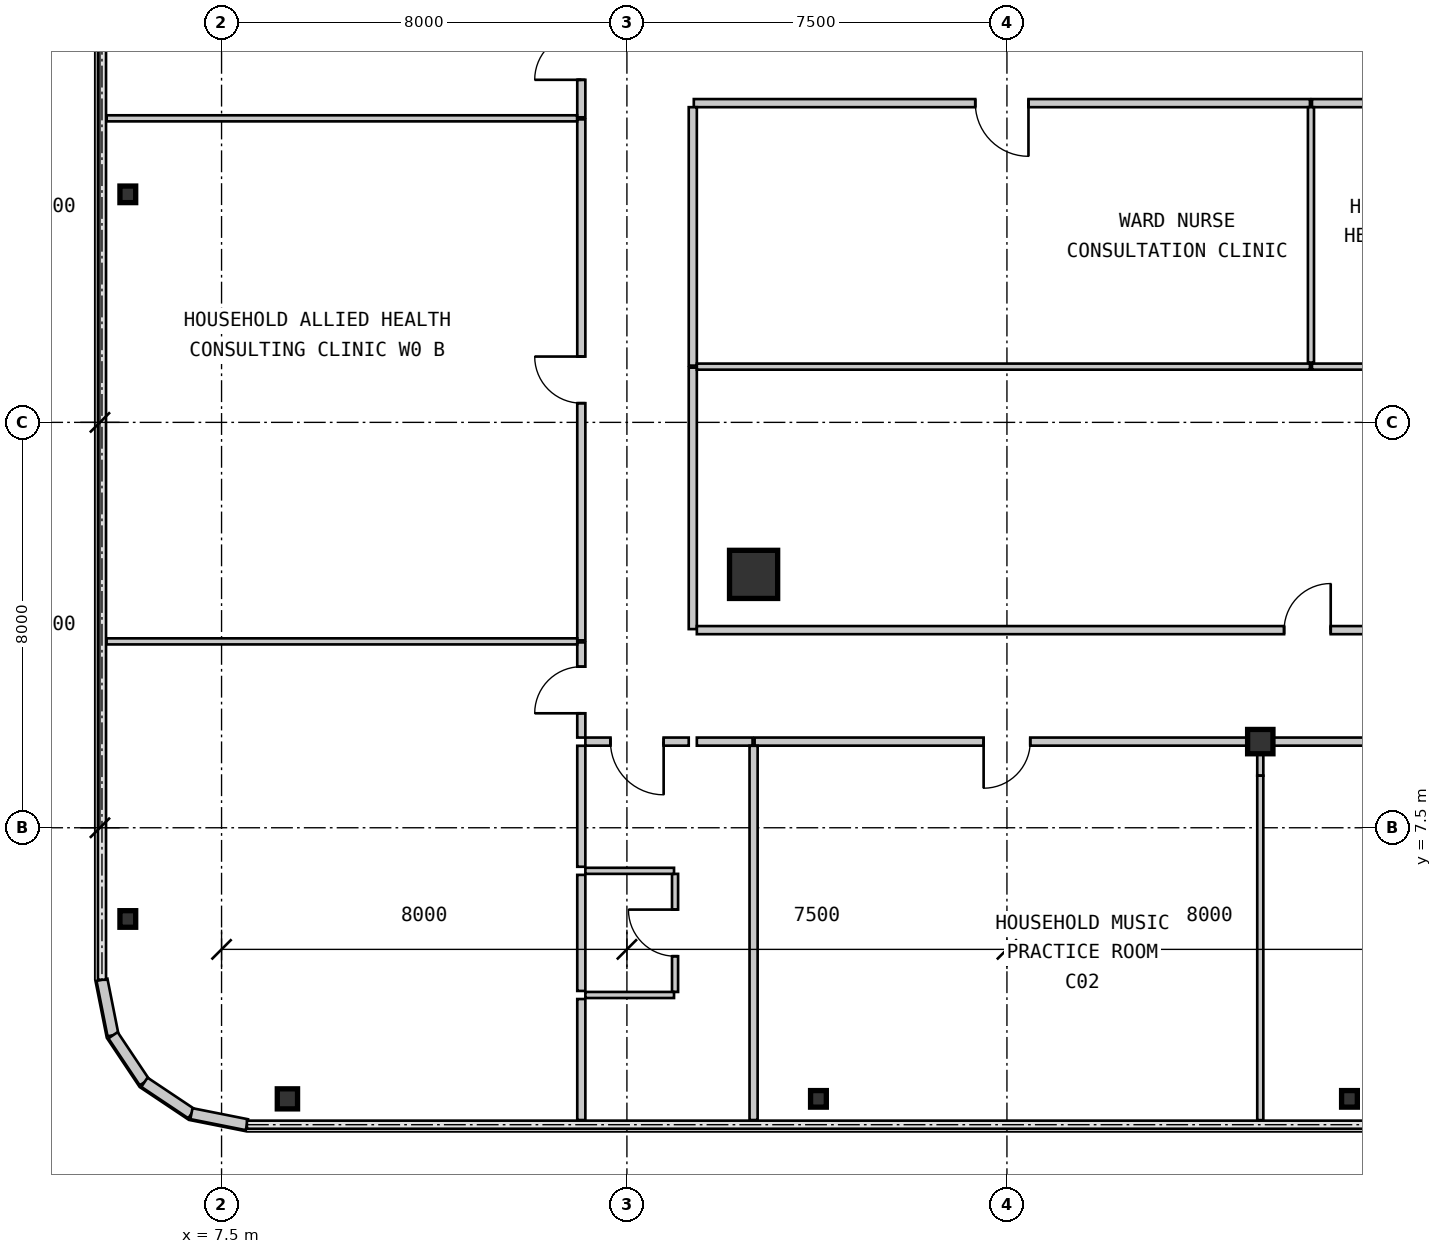
"""IFC4 building model, lengths in metres.
Left out: names, types, materials, properties, quantities, classifications, styles, units other than length and angle.
Written with IfcOpenShell. Run it as: python <this file> out.ifc"""

import sys

from ifc_helpers import new_model, si_unit, direction, frame, frame_2d, origin, origin_2d, place, context, subcontext, project, spatial, rectangle, i_section, extrude, source, transform, mapped, element, fill, save


model = new_model("IFC4")
c1 = context("Model", 3, precision=1e-05, world=origin(), true_north=direction((0.0, 1.0)))
c2 = subcontext(c1, "Body", "Model", "MODEL_VIEW")
j1 = project(units=[si_unit("LENGTHUNIT", "METRE"), si_unit("PLANEANGLEUNIT", "RADIAN")], contexts=[c1])
p1 = place(None, origin())
s1 = spatial("IfcSite", under=j1, at=p1, CompositionType="ELEMENT")
p2 = place(p1, origin())
s2 = spatial("IfcBuilding", under=s1, at=p2, CompositionType="ELEMENT")
p3 = place(p2, frame((0.0, 0.0, 26.25)))
s3 = spatial("IfcBuildingStorey", under=s2, at=p3, CompositionType="ELEMENT", Elevation=26.25)
m1 = source(origin(), c2, "Body", "SweptSolid", [
    extrude(i_section(OverallWidth=0.5, OverallDepth=0.48, WebThickness=0.028, FlangeThickness=0.044, at=origin_2d()), origin(), (0.0, 0.0, 1.0), 3.15),
])
p4 = place(p3, frame((28.0, 9.2, 0.0), z_axis=(0.0, 0.0, 1.0), x_axis=(1.0, 0.0, 0.0)))
e1 = element("IfcColumn", 1, at=p4, inside=s3, PredefinedType="COLUMN", context=c2, shape_type="MappedRepresentation", body=[
    mapped(m1, transform((0.0, 0.0, 0.0), scale=1.0)),
])
m2 = source(origin(), c2, "Body", "SweptSolid", [
    extrude(rectangle(XDim=0.95, YDim=0.95, at=origin_2d()), origin(), (0.0, 0.0, 1.0), 3.15),
])
p5 = place(p3, frame((18.0, 12.5, 0.0), z_axis=(0.0, 0.0, 1.0), x_axis=(1.0, 0.0, 0.0)))
e2 = element("IfcColumn", 2, at=p5, inside=s3, PredefinedType="COLUMN", context=c2, shape_type="MappedRepresentation", body=[
    mapped(m2, transform((0.0, 0.0, 0.0), scale=1.0)),
])
m3 = source(origin(), c2, "Body", "SweptSolid", [
    extrude(i_section(OverallWidth=0.4, OverallDepth=0.396, WebThickness=0.022, FlangeThickness=0.034, at=origin_2d()), origin(), (0.0, 0.0, 1.0), 3.15),
])
p6 = place(p3, frame((8.8, 2.15, 0.0), z_axis=(0.0, 0.0, 1.0), x_axis=(1.0, 0.0, 0.0)))
e3 = element("IfcColumn", 3, at=p6, inside=s3, PredefinedType="COLUMN", context=c2, shape_type="MappedRepresentation", body=[
    mapped(m3, transform((0.0, 0.0, 0.0), scale=1.0)),
])
m4 = source(origin(), c2, "Body", "SweptSolid", [
    extrude(i_section(OverallWidth=0.311, OverallDepth=0.327, WebThickness=0.016, FlangeThickness=0.025, at=origin_2d()), origin(), (0.0, 0.0, 1.0), 3.15),
])
for number, where, z_axis, x_axis in (
    (4, (19.28, 2.15, 0.0), (0.0, 0.0, 1.0), (1.0, 0.0, 0.0)),
    (5, (29.76, 2.15, 0.0), (0.0, 0.0, 1.0), (1.0, 0.0, 0.0)),
    (6, (5.65, 5.7, 0.0), (0.0, 0.0, 1.0), (1.0, 0.0, 0.0)),
    (7, (5.65, 20.0, 0.0), (0.0, 0.0, 1.0), (1.0, 0.0, 0.0)),
):
    element("IfcColumn", number, at=place(p3, frame(where, z_axis=z_axis, x_axis=x_axis)), inside=s3, PredefinedType="COLUMN", context=c2, shape_type="MappedRepresentation", body=[
        mapped(m4, transform((0.0, 0.0, 0.0), scale=1.0)),
    ])
m5 = source(origin(), c2, "Body", "SweptSolid", [
    extrude(rectangle(XDim=1.116, YDim=0.22, at=frame_2d((0.558, 0.0))), origin(), (0.0, 0.0, 1.0), 2.93),
])
for number, where, z_axis, x_axis in (
    (8, (5.14, 4.5, 0.0), (0.0, 0.0, 1.0), (0.195, -0.981, 0.0)),
    (9, (5.358, 3.406, 0.0), (0.0, 0.0, 1.0), (0.556, -0.831, 0.0)),
    (10, (5.978, 2.478, 0.0), (0.0, 0.0, 1.0), (0.831, -0.556, 0.0)),
    (11, (6.906, 1.858, 0.0), (0.0, 0.0, 1.0), (0.981, -0.195, 0.0)),
):
    element("IfcWall", number, at=place(p3, frame(where, z_axis=z_axis, x_axis=x_axis)), inside=s3, PredefinedType="SOLIDWALL", context=c2, shape_type="MappedRepresentation", body=[
        mapped(m5, transform((0.0, 0.0, 0.0), scale=1.0)),
    ])
m6 = source(origin(), c2, "Body", "SweptSolid", [
    extrude(rectangle(XDim=5.16, YDim=0.16, at=frame_2d((2.58, 0.0))), origin(), (0.0, 0.0, 1.0), 2.93),
])
p7 = place(p3, frame((16.8, 16.58, 0.0), z_axis=(0.0, 0.0, 1.0), x_axis=(0.0, -1.0, 0.0)))
e12 = element("IfcWall", 12, at=p7, inside=s3, PredefinedType="PARTITIONING", context=c2, shape_type="MappedRepresentation", body=[
    mapped(m6, transform((0.0, 0.0, 0.0), scale=1.0)),
])
m7 = source(origin(), c2, "Body", "SweptSolid", [
    extrude(rectangle(XDim=12.159, YDim=0.16, at=frame_2d((6.08, 0.0))), origin(), (0.0, 0.0, 1.0), 2.93),
])
p8 = place(p3, frame((28.98, 21.8, 0.0), z_axis=(0.0, 0.0, 1.0), x_axis=(-1.0, 0.0, 0.0)))
e13 = element("IfcWall", 13, at=p8, inside=s3, PredefinedType="PARTITIONING", context=c2, shape_type="MappedRepresentation", body=[
    mapped(m7, transform((0.0, 0.0, 0.0), scale=1.0)),
])
m8 = source(origin(), c2, "Body", "SweptSolid", [
    extrude(rectangle(XDim=1.05, YDim=2.1, at=frame_2d((0.525, 1.05))), frame((0.0, 0.09, 0.0), z_axis=(0.0, -1.0, 0.0), x_axis=(1.0, 0.0, 0.0)), (0.0, 0.0, 1.0), 0.18),
])
p9 = place(p8, frame((5.555, 0.0, 0.0)))
e14 = element("IfcOpeningElement", 14, at=p9, cuts=e13, PredefinedType="OPENING", context=c2, shape_type="MappedRepresentation", body=[
    mapped(m8, transform((0.0, 0.0, 0.0), scale=1.0)),
])
m9 = source(origin(), c2, "Body", "SweptSolid", [
    extrude(rectangle(XDim=5.1, YDim=0.16, at=frame_2d((2.55, 0.0))), origin(), (0.0, 0.0, 1.0), 2.93),
])
p10 = place(p3, frame((16.8, 21.72, 0.0), z_axis=(0.0, 0.0, 1.0), x_axis=(0.0, -1.0, 0.0)))
e15 = element("IfcWall", 15, at=p10, inside=s3, PredefinedType="PARTITIONING", context=c2, shape_type="MappedRepresentation", body=[
    mapped(m9, transform((0.0, 0.0, 0.0), scale=1.0)),
])
m10 = source(origin(), c2, "Body", "SweptSolid", [
    extrude(rectangle(XDim=24.159, YDim=0.16, at=frame_2d((12.08, 0.0))), origin(), (0.0, 0.0, 1.0), 2.93),
])
p11 = place(p3, frame((53.18, 21.8, 0.0), z_axis=(0.0, 0.0, 1.0), x_axis=(-1.0, 0.0, 0.0)))
e16 = element("IfcWall", 16, at=p11, inside=s3, PredefinedType="PARTITIONING", context=c2, shape_type="MappedRepresentation", body=[
    mapped(m10, transform((0.0, 0.0, 0.0), scale=1.0)),
])
m11 = source(origin(), c2, "Body", "SweptSolid", [
    extrude(rectangle(XDim=0.92, YDim=2.1, at=frame_2d((0.46, 1.05))), frame((0.0, 0.09, 0.0), z_axis=(0.0, -1.0, 0.0), x_axis=(1.0, 0.0, 0.0)), (0.0, 0.0, 1.0), 0.18),
])
p12 = place(p11, frame((11.62, 0.0, 0.0)))
e17 = element("IfcOpeningElement", 17, at=p12, cuts=e16, PredefinedType="OPENING", context=c2, shape_type="MappedRepresentation", body=[
    mapped(m11, transform((0.0, 0.0, 0.0), scale=1.0)),
])
m12 = source(origin(), c2, "Body", "SweptSolid", [
    extrude(rectangle(XDim=2.04, YDim=0.16, at=frame_2d((1.02, 0.0))), origin(), (0.0, 0.0, 1.0), 2.93),
])
p13 = place(p3, frame((16.72, 9.2, 0.0), z_axis=(0.0, 0.0, 1.0), x_axis=(-1.0, 0.0, 0.0)))
e18 = element("IfcWall", 18, at=p13, inside=s3, PredefinedType="PARTITIONING", context=c2, shape_type="MappedRepresentation", body=[
    mapped(m12, transform((0.0, 0.0, 0.0), scale=1.0)),
])
p14 = place(p13, frame((0.495, 0.0, 0.0)))
e19 = element("IfcOpeningElement", 19, at=p14, cuts=e18, PredefinedType="OPENING", context=c2, shape_type="MappedRepresentation", body=[
    mapped(m8, transform((0.0, 0.0, 0.0), scale=1.0)),
])
m13 = source(origin(), c2, "Body", "SweptSolid", [
    extrude(rectangle(XDim=1.878, YDim=0.16, at=frame_2d((0.939, 0.0))), origin(), (0.0, 0.0, 1.0), 2.93),
])
p15 = place(p3, frame((14.6, 9.28, 0.0), z_axis=(0.0, 0.0, 1.0), x_axis=(0.0, 1.0, 0.0)))
e20 = element("IfcWall", 20, at=p15, inside=s3, PredefinedType="PARTITIONING", context=c2, shape_type="MappedRepresentation", body=[
    mapped(m13, transform((0.0, 0.0, 0.0), scale=1.0)),
])
p16 = place(p15, frame((0.479, 0.0, 0.0)))
e21 = element("IfcOpeningElement", 21, at=p16, cuts=e20, PredefinedType="OPENING", context=c2, shape_type="MappedRepresentation", body=[
    mapped(m11, transform((0.0, 0.0, 0.0), scale=1.0)),
])
m14 = source(origin(), c2, "Body", "SweptSolid", [
    extrude(rectangle(XDim=10.281, YDim=0.16, at=frame_2d((5.141, 0.0))), origin(), (0.0, 0.0, 1.0), 2.93),
])
p17 = place(p3, frame((14.6, 11.198, 0.0), z_axis=(0.0, 0.0, 1.0), x_axis=(0.0, 1.0, 0.0)))
e22 = element("IfcWall", 22, at=p17, inside=s3, PredefinedType="PARTITIONING", context=c2, shape_type="MappedRepresentation", body=[
    mapped(m14, transform((0.0, 0.0, 0.0), scale=1.0)),
])
p18 = place(p17, frame((4.681, 0.0, 0.0)))
e23 = element("IfcOpeningElement", 23, at=p18, cuts=e22, PredefinedType="OPENING", context=c2, shape_type="MappedRepresentation", body=[
    mapped(m11, transform((0.0, 0.0, 0.0), scale=1.0)),
])
m15 = source(origin(), c2, "Body", "SweptSolid", [
    extrude(rectangle(XDim=2.4, YDim=0.16, at=frame_2d((1.2, 0.0))), origin(), (0.0, 0.0, 1.0), 2.93),
])
p19 = place(p3, frame((14.6, 21.52, 0.0), z_axis=(0.0, 0.0, 1.0), x_axis=(0.0, 1.0, 0.0)))
e24 = element("IfcWall", 24, at=p19, inside=s3, PredefinedType="PARTITIONING", context=c2, shape_type="MappedRepresentation", body=[
    mapped(m15, transform((0.0, 0.0, 0.0), scale=1.0)),
])
p20 = place(p19, frame((0.74, 0.0, 0.0)))
e25 = element("IfcOpeningElement", 25, at=p20, cuts=e24, PredefinedType="OPENING", context=c2, shape_type="MappedRepresentation", body=[
    mapped(m11, transform((0.0, 0.0, 0.0), scale=1.0)),
])
m16 = source(origin(), c2, "Body", "SweptSolid", [
    extrude(rectangle(XDim=24.1, YDim=0.16, at=frame_2d((12.05, 0.0))), origin(), (0.0, 0.0, 1.0), 2.93),
])
p21 = place(p3, frame((16.88, 11.4, 0.0), z_axis=(0.0, 0.0, 1.0), x_axis=(1.0, 0.0, 0.0)))
e26 = element("IfcWall", 26, at=p21, inside=s3, PredefinedType="PARTITIONING", context=c2, shape_type="MappedRepresentation", body=[
    mapped(m16, transform((0.0, 0.0, 0.0), scale=1.0)),
])
p22 = place(p21, frame((11.59, 0.0, 0.0)))
e27 = element("IfcOpeningElement", 27, at=p22, cuts=e26, PredefinedType="OPENING", context=c2, shape_type="MappedRepresentation", body=[
    mapped(m11, transform((0.0, 0.0, 0.0), scale=1.0)),
])
m17 = source(origin(), c2, "Body", "SweptSolid", [
    extrude(rectangle(XDim=1.1, YDim=0.16, at=frame_2d((0.55, 0.0))), origin(), (0.0, 0.0, 1.0), 2.93),
])
p23 = place(p3, frame((17.98, 9.2, 0.0), z_axis=(0.0, 0.0, 1.0), x_axis=(-1.0, 0.0, 0.0)))
e28 = element("IfcWall", 28, at=p23, inside=s3, PredefinedType="PARTITIONING", context=c2, shape_type="MappedRepresentation", body=[
    mapped(m17, transform((0.0, 0.0, 0.0), scale=1.0)),
])
m18 = source(origin(), c2, "Body", "SweptSolid", [
    extrude(rectangle(XDim=9.959, YDim=0.16, at=frame_2d((4.98, 0.0))), origin(), (0.0, 0.0, 1.0), 2.93),
])
p24 = place(p3, frame((27.98, 9.2, 0.0), z_axis=(0.0, 0.0, 1.0), x_axis=(-1.0, 0.0, 0.0)))
e29 = element("IfcWall", 29, at=p24, inside=s3, PredefinedType="PARTITIONING", context=c2, shape_type="MappedRepresentation", body=[
    mapped(m18, transform((0.0, 0.0, 0.0), scale=1.0)),
])
p25 = place(p24, frame((4.52, 0.0, 0.0)))
e30 = element("IfcOpeningElement", 30, at=p25, cuts=e29, PredefinedType="OPENING", context=c2, shape_type="MappedRepresentation", body=[
    mapped(m11, transform((0.0, 0.0, 0.0), scale=1.0)),
])
m19 = source(origin(), c2, "Body", "SweptSolid", [
    extrude(rectangle(XDim=13.959, YDim=0.16, at=frame_2d((6.98, 0.0))), origin(), (0.0, 0.0, 1.0), 2.328),
])
p26 = place(p3, frame((41.98, 9.2, 0.0), z_axis=(0.0, 0.0, 1.0), x_axis=(-1.0, 0.0, 0.0)))
e31 = element("IfcWall", 31, at=p26, inside=s3, PredefinedType="PARTITIONING", context=c2, shape_type="MappedRepresentation", body=[
    mapped(m19, transform((0.0, 0.0, 0.0), scale=1.0)),
])
p27 = place(p26, frame((6.52, 0.0, 0.0)))
e32 = element("IfcOpeningElement", 32, at=p27, cuts=e31, PredefinedType="OPENING", context=c2, shape_type="MappedRepresentation", body=[
    mapped(m11, transform((0.0, 0.0, 0.0), scale=1.0)),
])
m20 = source(origin(), c2, "Body", "SweptSolid", [
    extrude(rectangle(XDim=12.1, YDim=0.12, at=frame_2d((6.05, 0.0))), origin(), (0.0, 0.0, 1.0), 2.93),
])
p28 = place(p3, frame((16.88, 16.6, 0.0), z_axis=(0.0, 0.0, 1.0), x_axis=(1.0, 0.0, 0.0)))
e33 = element("IfcWall", 33, at=p28, inside=s3, PredefinedType="PARTITIONING", context=c2, shape_type="MappedRepresentation", body=[
    mapped(m20, transform((0.0, 0.0, 0.0), scale=1.0)),
])
m21 = source(origin(), c2, "Body", "SweptSolid", [
    extrude(rectangle(XDim=11.9, YDim=0.12, at=frame_2d((5.95, 0.0))), origin(), (0.0, 0.0, 1.0), 2.93),
])
p29 = place(p3, frame((29.02, 16.6, 0.0), z_axis=(0.0, 0.0, 1.0), x_axis=(1.0, 0.0, 0.0)))
e34 = element("IfcWall", 34, at=p29, inside=s3, PredefinedType="PARTITIONING", context=c2, shape_type="MappedRepresentation", body=[
    mapped(m21, transform((0.0, 0.0, 0.0), scale=1.0)),
])
m22 = source(origin(), c2, "Body", "SweptSolid", [
    extrude(rectangle(XDim=5.04, YDim=0.12, at=frame_2d((2.52, 0.0))), origin(), (0.0, 0.0, 1.0), 2.93),
])
p30 = place(p3, frame((29.0, 21.72, 0.0), z_axis=(0.0, 0.0, 1.0), x_axis=(0.0, -1.0, 0.0)))
e35 = element("IfcWall", 35, at=p30, inside=s3, PredefinedType="PARTITIONING", context=c2, shape_type="MappedRepresentation", body=[
    mapped(m22, transform((0.0, 0.0, 0.0), scale=1.0)),
])
m23 = source(origin(), c2, "Body", "SweptSolid", [
    extrude(rectangle(XDim=2.33, YDim=0.12, at=frame_2d((1.165, 0.0))), origin(), (0.0, 0.0, 1.0), 2.93),
])
p31 = place(p3, frame((16.45, 4.26, 0.0), z_axis=(0.0, 0.0, 1.0), x_axis=(0.0, 1.0, 0.0)))
e36 = element("IfcWall", 36, at=p31, inside=s3, PredefinedType="PARTITIONING", context=c2, shape_type="MappedRepresentation", body=[
    mapped(m23, transform((0.0, 0.0, 0.0), scale=1.0)),
])
m24 = source(origin(), c2, "Body", "SweptSolid", [
    extrude(rectangle(XDim=0.92, YDim=2.1, at=frame_2d((0.46, 1.05))), frame((0.0, 0.07, 0.0), z_axis=(0.0, -1.0, 0.0), x_axis=(1.0, 0.0, 0.0)), (0.0, 0.0, 1.0), 0.14),
])
p32 = place(p31, frame((0.705, 0.0, 0.0)))
e37 = element("IfcOpeningElement", 37, at=p32, cuts=e36, PredefinedType="OPENING", context=c2, shape_type="MappedRepresentation", body=[
    mapped(m24, transform((0.0, 0.0, 0.0), scale=1.0)),
])
m25 = source(origin(), c2, "Body", "SweptSolid", [
    extrude(rectangle(XDim=1.75, YDim=0.12, at=frame_2d((0.875, 0.0))), origin(), (0.0, 0.0, 1.0), 2.93),
])
for number, where, z_axis, x_axis in (
    (38, (14.68, 4.2, 0.0), (0.0, 0.0, 1.0), (1.0, 0.0, 0.0)),
    (39, (16.43, 6.65, 0.0), (0.0, 0.0, 1.0), (-1.0, 0.0, 0.0)),
):
    element("IfcWall", number, at=place(p3, frame(where, z_axis=z_axis, x_axis=x_axis)), inside=s3, PredefinedType="PARTITIONING", context=c2, shape_type="MappedRepresentation", body=[
        mapped(m25, transform((0.0, 0.0, 0.0), scale=1.0)),
    ])
m26 = source(origin(), c2, "Body", "SweptSolid", [
    extrude(rectangle(XDim=7.386, YDim=0.16, at=frame_2d((3.693, 0.0))), origin(), (0.0, 0.0, 1.0), 2.93),
])
p33 = place(p3, frame((18.0, 9.118, 0.0), z_axis=(0.0, 0.0, 1.0), x_axis=(0.0, -1.0, 0.0)))
e40 = element("IfcWall", 40, at=p33, inside=s3, PredefinedType="PARTITIONING", context=c2, shape_type="MappedRepresentation", body=[
    mapped(m26, transform((0.0, 0.0, 0.0), scale=1.0)),
])
m27 = source(origin(), c2, "Body", "SweptSolid", [
    extrude(rectangle(XDim=2.388, YDim=0.16, at=frame_2d((1.194, 0.0))), origin(), (0.0, 0.0, 1.0), 2.93),
])
p34 = place(p3, frame((14.6, 1.732, 0.0), z_axis=(0.0, 0.0, 1.0), x_axis=(0.0, 1.0, 0.0)))
e41 = element("IfcWall", 41, at=p34, inside=s3, PredefinedType="PARTITIONING", context=c2, shape_type="MappedRepresentation", body=[
    mapped(m27, transform((0.0, 0.0, 0.0), scale=1.0)),
])
m28 = source(origin(), c2, "Body", "SweptSolid", [
    extrude(rectangle(XDim=2.388, YDim=0.16, at=frame_2d((1.194, 0.0))), origin(), (0.0, 0.0, 1.0), 2.93),
])
p35 = place(p3, frame((14.6, 6.73, 0.0), z_axis=(0.0, 0.0, 1.0), x_axis=(0.0, 1.0, 0.0)))
e42 = element("IfcWall", 42, at=p35, inside=s3, PredefinedType="PARTITIONING", context=c2, shape_type="MappedRepresentation", body=[
    mapped(m28, transform((0.0, 0.0, 0.0), scale=1.0)),
])
m29 = source(origin(), c2, "Body", "SweptSolid", [
    extrude(rectangle(XDim=2.29, YDim=0.16, at=frame_2d((1.145, 0.0))), origin(), (0.0, 0.0, 1.0), 2.93),
])
p36 = place(p3, frame((14.6, 4.28, 0.0), z_axis=(0.0, 0.0, 1.0), x_axis=(0.0, 1.0, 0.0)))
e43 = element("IfcWall", 43, at=p36, inside=s3, PredefinedType="PARTITIONING", context=c2, shape_type="MappedRepresentation", body=[
    mapped(m29, transform((0.0, 0.0, 0.0), scale=1.0)),
])
m30 = source(origin(), c2, "Body", "SweptSolid", [
    extrude(rectangle(XDim=0.592, YDim=0.12, at=frame_2d((0.296, 0.0))), origin(), (0.0, 0.0, 1.0), 2.397),
])
p37 = place(p3, frame((28.0, 9.12, 0.0), z_axis=(0.0, 0.0, 1.0), x_axis=(0.0, -1.0, 0.0)))
e44 = element("IfcWall", 44, at=p37, inside=s3, PredefinedType="PARTITIONING", context=c2, shape_type="MappedRepresentation", body=[
    mapped(m30, transform((0.0, 0.0, 0.0), scale=1.0)),
])
m31 = source(origin(), c2, "Body", "SweptSolid", [
    extrude(rectangle(XDim=6.798, YDim=0.12, at=frame_2d((3.399, 0.0))), origin(), (0.0, 0.0, 1.0), 2.93),
])
p38 = place(p3, frame((28.0, 8.528, 0.0), z_axis=(0.0, 0.0, 1.0), x_axis=(0.0, -1.0, 0.0)))
e45 = element("IfcWall", 45, at=p38, inside=s3, PredefinedType="PARTITIONING", context=c2, shape_type="MappedRepresentation", body=[
    mapped(m31, transform((0.0, 0.0, 0.0), scale=1.0)),
])
m32 = source(origin(), c2, "Body", "SweptSolid", [
    extrude(rectangle(XDim=9.29, YDim=0.12, at=frame_2d((4.645, 0.0))), origin(), (0.0, 0.0, 1.0), 2.93),
])
p39 = place(p3, frame((5.23, 11.178, 0.0), z_axis=(0.0, 0.0, 1.0), x_axis=(1.0, 0.0, 0.0)))
e46 = element("IfcWall", 46, at=p39, inside=s3, PredefinedType="PARTITIONING", context=c2, shape_type="MappedRepresentation", body=[
    mapped(m32, transform((0.0, 0.0, 0.0), scale=1.0)),
])
m33 = source(origin(), c2, "Body", "SweptSolid", [
    extrude(rectangle(XDim=9.284, YDim=0.12, at=frame_2d((4.642, 0.0))), origin(), (0.0, 0.0, 1.0), 2.93),
])
p40 = place(p3, frame((5.233, 21.5, 0.0), z_axis=(0.0, 0.0, 1.0), x_axis=(1.0, 0.0, 0.0)))
e47 = element("IfcWall", 47, at=p40, inside=s3, PredefinedType="PARTITIONING", context=c2, shape_type="MappedRepresentation", body=[
    mapped(m33, transform((0.0, 0.0, 0.0), scale=1.0)),
])
m34 = source(origin(), c2, "Body", "SweptSolid", [
    extrude(rectangle(XDim=1.05, YDim=2.1, at=frame_2d((0.525, 1.05))), frame((0.0, 0.025, 0.0), z_axis=(0.0, -1.0, 0.0), x_axis=(1.0, 0.0, 0.0)), (0.0, 0.0, 1.0), 0.05),
])
p41 = place(p9, origin())
e48 = element("IfcDoor", 48, at=p41, inside=s3, OperationType="SINGLE_SWING_LEFT", PredefinedType="DOOR", context=c2, shape_type="MappedRepresentation", body=[
    mapped(m34, transform((0.0, 0.0, 0.0), scale=1.0)),
])
fill(e14, e48)
p42 = place(p14, origin())
e49 = element("IfcDoor", 49, at=p42, inside=s3, OperationType="SINGLE_SWING_LEFT", PredefinedType="DOOR", context=c2, shape_type="MappedRepresentation", body=[
    mapped(m34, transform((0.0, 0.0, 0.0), scale=1.0)),
])
fill(e19, e49)
m35 = source(origin(), c2, "Body", "SweptSolid", [
    extrude(rectangle(XDim=0.92, YDim=2.1, at=frame_2d((0.46, 1.05))), frame((0.0, 0.025, 0.0), z_axis=(0.0, -1.0, 0.0), x_axis=(1.0, 0.0, 0.0)), (0.0, 0.0, 1.0), 0.05),
])
p43 = place(p16, origin())
e50 = element("IfcDoor", 50, at=p43, inside=s3, OperationType="SINGLE_SWING_LEFT", PredefinedType="DOOR", context=c2, shape_type="MappedRepresentation", body=[
    mapped(m35, transform((0.0, 0.0, 0.0), scale=1.0)),
])
fill(e21, e50)
p44 = place(p18, origin())
e51 = element("IfcDoor", 51, at=p44, inside=s3, OperationType="SINGLE_SWING_RIGHT", PredefinedType="DOOR", context=c2, shape_type="MappedRepresentation", body=[
    mapped(m35, transform((0.0, 0.0, 0.0), scale=1.0)),
])
fill(e23, e51)
p45 = place(p20, origin())
e52 = element("IfcDoor", 52, at=p45, inside=s3, OperationType="SINGLE_SWING_LEFT", PredefinedType="DOOR", context=c2, shape_type="MappedRepresentation", body=[
    mapped(m35, transform((0.0, 0.0, 0.0), scale=1.0)),
])
fill(e25, e52)
p46 = place(p22, origin())
e53 = element("IfcDoor", 53, at=p46, inside=s3, OperationType="SINGLE_SWING_RIGHT", PredefinedType="DOOR", context=c2, shape_type="MappedRepresentation", body=[
    mapped(m35, transform((0.0, 0.0, 0.0), scale=1.0)),
])
fill(e27, e53)
p47 = place(p25, origin())
e54 = element("IfcDoor", 54, at=p47, inside=s3, OperationType="SINGLE_SWING_RIGHT", PredefinedType="DOOR", context=c2, shape_type="MappedRepresentation", body=[
    mapped(m35, transform((0.0, 0.0, 0.0), scale=1.0)),
])
fill(e30, e54)
p48 = place(p32, origin())
e55 = element("IfcDoor", 55, at=p48, inside=s3, OperationType="SINGLE_SWING_RIGHT", PredefinedType="DOOR", context=c2, shape_type="MappedRepresentation", body=[
    mapped(m35, transform((0.0, 0.0, 0.0), scale=1.0)),
])
fill(e37, e55)
save(model, sys.argv[1])
